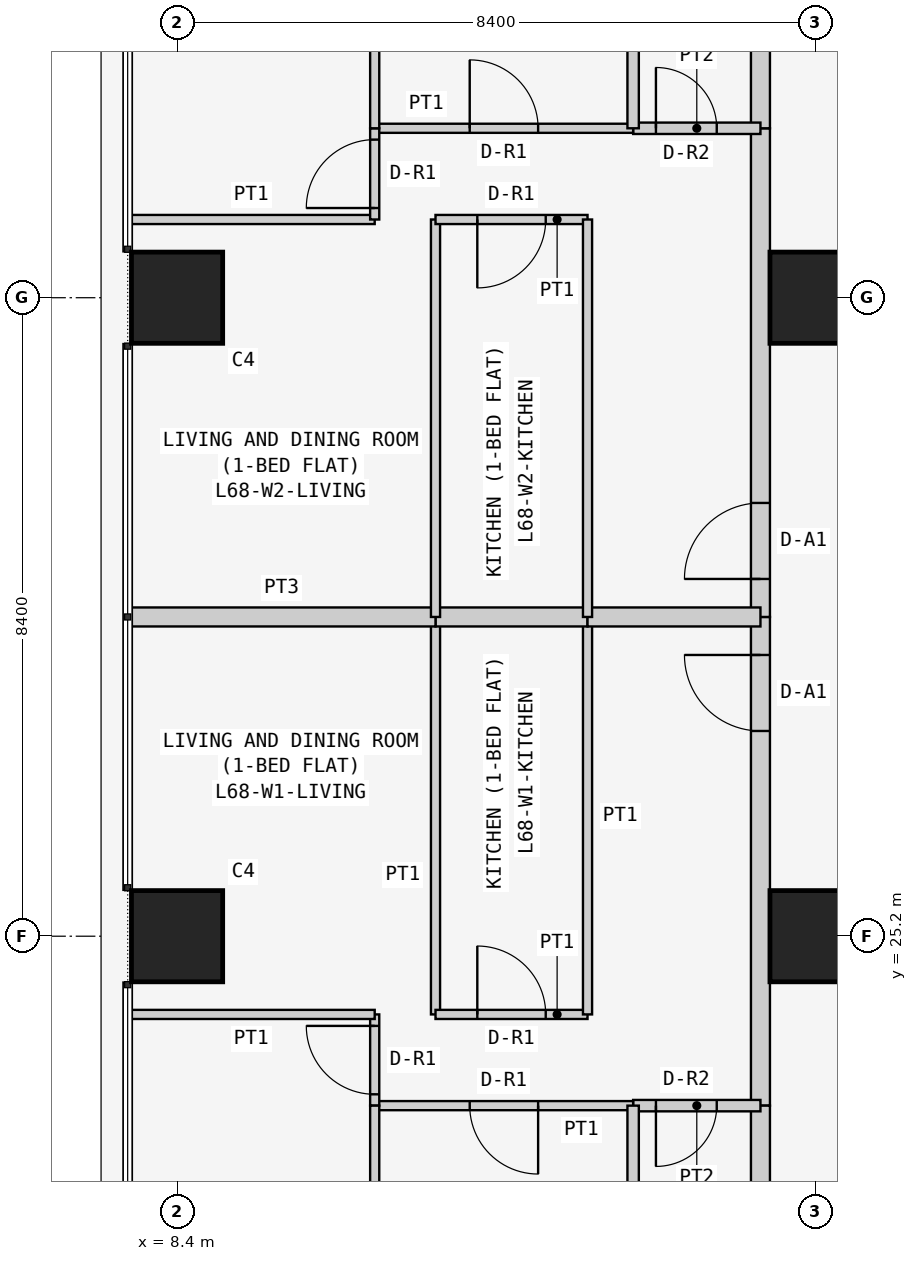
"""IFC4 building model, lengths in metres.
Left out: names, types, materials, properties, quantities, classifications, styles, units other than length and angle.
Written with IfcOpenShell. Run it as: python <this file> out.ifc"""

import sys

from ifc_helpers import new_model, si_unit, direction, frame, frame_2d, origin, origin_2d, place, context, subcontext, project, spatial, rectangle, extrude, element, fill, save


model = new_model("IFC4")
c1 = context("Model", 3, precision=1e-05, world=origin(), true_north=direction((0.0, 1.0)))
c2 = subcontext(c1, "Body", "Model", "MODEL_VIEW")
j1 = project(units=[si_unit("LENGTHUNIT", "METRE"), si_unit("PLANEANGLEUNIT", "RADIAN")], contexts=[c1])
p1 = place(None, origin())
s1 = spatial("IfcSite", under=j1, at=p1, CompositionType="ELEMENT")
p2 = place(p1, origin())
s2 = spatial("IfcBuilding", under=s1, at=p2, CompositionType="ELEMENT")
p3 = place(p2, frame((0.0, 0.0, 261.3)))
s3 = spatial("IfcBuildingStorey", under=s2, at=p3, CompositionType="ELEMENT", Elevation=261.3)
for number, where, z_axis, x_axis in (
    (1, (8.4, 25.2, 0.0), (0.0, 0.0, 1.0), (1.0, 0.0, 0.0)),
    (2, (8.4, 33.6, 0.0), (0.0, 0.0, 1.0), (1.0, 0.0, 0.0)),
    (3, (16.8, 25.2, 0.0), (0.0, 0.0, 1.0), (1.0, 0.0, 0.0)),
    (4, (16.8, 33.6, 0.0), (0.0, 0.0, 1.0), (1.0, 0.0, 0.0)),
):
    element("IfcColumn", number, at=place(p3, frame(where, z_axis=z_axis, x_axis=x_axis)), inside=s3, PredefinedType="COLUMN", context=c2, shape_type="SweptSolid", body=[
        extrude(rectangle(XDim=1.2, YDim=1.2, at=origin_2d()), origin(), (0.0, 0.0, 1.0), 3.6),
    ])
p4 = place(p3, frame((16.075, 22.971, 0.0), z_axis=(0.0, 0.0, 1.0), x_axis=(0.0, 1.0, 0.0)))
e5 = element("IfcWall", 5, at=p4, inside=s3, PredefinedType="PARTITIONING", context=c2, shape_type="SweptSolid", body=[
    extrude(rectangle(XDim=6.429, YDim=0.25, at=frame_2d((3.214, 0.0))), origin(), (0.0, 0.0, 1.0), 3.45),
])
p5 = place(p4, frame((4.929, 0.0, 0.0)))
e6 = element("IfcOpeningElement", 6, at=p5, cuts=e5, PredefinedType="OPENING", context=c2, shape_type="SweptSolid", body=[
    extrude(rectangle(XDim=1.0, YDim=2.1, at=frame_2d((0.5, 1.05))), frame((0.0, 0.135, 0.0), z_axis=(0.0, -1.0, 0.0), x_axis=(1.0, 0.0, 0.0)), (0.0, 0.0, 1.0), 0.27),
])
p6 = place(p3, frame((16.075, 16.1, 0.0), z_axis=(0.0, 0.0, 1.0), x_axis=(0.0, 1.0, 0.0)))
e7 = element("IfcWall", 7, at=p6, inside=s3, PredefinedType="PARTITIONING", context=c2, shape_type="SweptSolid", body=[
    extrude(rectangle(XDim=6.871, YDim=0.25, at=frame_2d((3.436, 0.0))), origin(), (0.0, 0.0, 1.0), 3.45),
])
p7 = place(p3, frame((16.075, 29.4, 0.0), z_axis=(0.0, 0.0, 1.0), x_axis=(0.0, 1.0, 0.0)))
e8 = element("IfcWall", 8, at=p7, inside=s3, PredefinedType="PARTITIONING", context=c2, shape_type="SweptSolid", body=[
    extrude(rectangle(XDim=6.429, YDim=0.25, at=frame_2d((3.215, 0.0))), origin(), (0.0, 0.0, 1.0), 3.45),
])
p8 = place(p7, frame((0.5, 0.0, 0.0)))
e9 = element("IfcOpeningElement", 9, at=p8, cuts=e8, PredefinedType="OPENING", context=c2, shape_type="SweptSolid", body=[
    extrude(rectangle(XDim=1.0, YDim=2.1, at=frame_2d((0.5, 1.05))), frame((0.0, 0.135, 0.0), z_axis=(0.0, -1.0, 0.0), x_axis=(1.0, 0.0, 0.0)), (0.0, 0.0, 1.0), 0.27),
])
p9 = place(p3, frame((16.075, 35.829, 0.0), z_axis=(0.0, 0.0, 1.0), x_axis=(0.0, 1.0, 0.0)))
e10 = element("IfcWall", 10, at=p9, inside=s3, PredefinedType="PARTITIONING", context=c2, shape_type="SweptSolid", body=[
    extrude(rectangle(XDim=6.871, YDim=0.25, at=frame_2d((3.436, 0.0))), origin(), (0.0, 0.0, 1.0), 3.45),
])
p10 = place(p3, frame((11.8, 29.4, 0.0), z_axis=(0.0, 0.0, 1.0), x_axis=(0.0, -1.0, 0.0)))
e11 = element("IfcWall", 11, at=p10, inside=s3, PredefinedType="PARTITIONING", context=c2, shape_type="SweptSolid", body=[
    extrude(rectangle(XDim=5.229, YDim=0.12, at=frame_2d((2.615, 0.0))), origin(), (0.0, 0.0, 1.0), 3.45),
])
p11 = place(p3, frame((11.8, 24.171, 0.0), z_axis=(0.0, 0.0, 1.0), x_axis=(1.0, 0.0, 0.0)))
e12 = element("IfcWall", 12, at=p11, inside=s3, PredefinedType="PARTITIONING", context=c2, shape_type="SweptSolid", body=[
    extrude(rectangle(XDim=2.0, YDim=0.12, at=frame_2d((1.0, 0.0))), origin(), (0.0, 0.0, 1.0), 3.45),
])
p12 = place(p11, frame((0.55, 0.0, 0.0)))
e13 = element("IfcOpeningElement", 13, at=p12, cuts=e12, PredefinedType="OPENING", context=c2, shape_type="SweptSolid", body=[
    extrude(rectangle(XDim=0.9, YDim=2.1, at=frame_2d((0.45, 1.05))), frame((0.0, 0.07, 0.0), z_axis=(0.0, -1.0, 0.0), x_axis=(1.0, 0.0, 0.0)), (0.0, 0.0, 1.0), 0.14),
])
p13 = place(p3, frame((13.8, 24.171, 0.0), z_axis=(0.0, 0.0, 1.0), x_axis=(0.0, 1.0, 0.0)))
e14 = element("IfcWall", 14, at=p13, inside=s3, PredefinedType="PARTITIONING", context=c2, shape_type="SweptSolid", body=[
    extrude(rectangle(XDim=5.229, YDim=0.12, at=frame_2d((2.615, 0.0))), origin(), (0.0, 0.0, 1.0), 3.45),
])
p14 = place(p3, frame((13.8, 29.4, 0.0), z_axis=(0.0, 0.0, 1.0), x_axis=(-1.0, 0.0, 0.0)))
e15 = element("IfcWall", 15, at=p14, inside=s3, PredefinedType="PARTITIONING", context=c2, shape_type="SweptSolid", body=[
    extrude(rectangle(XDim=2.0, YDim=0.25, at=frame_2d((1.0, 0.0))), origin(), (0.0, 0.0, 1.0), 3.45),
])
p15 = place(p3, frame((16.075, 22.971, 0.0), z_axis=(0.0, 0.0, 1.0), x_axis=(-1.0, 0.0, 0.0)))
e16 = element("IfcWall", 16, at=p15, inside=s3, PredefinedType="PARTITIONING", context=c2, shape_type="SweptSolid", body=[
    extrude(rectangle(XDim=1.675, YDim=0.15, at=frame_2d((0.837, 0.0))), origin(), (0.0, 0.0, 1.0), 3.45),
])
p16 = place(p15, frame((0.575, 0.0, 0.0)))
e17 = element("IfcOpeningElement", 17, at=p16, cuts=e16, PredefinedType="OPENING", context=c2, shape_type="SweptSolid", body=[
    extrude(rectangle(XDim=0.8, YDim=2.1, at=frame_2d((0.4, 1.05))), frame((0.0, 0.085, 0.0), z_axis=(0.0, -1.0, 0.0), x_axis=(1.0, 0.0, 0.0)), (0.0, 0.0, 1.0), 0.17),
])
p17 = place(p3, frame((14.4, 22.971, 0.0), z_axis=(0.0, 0.0, 1.0), x_axis=(-1.0, 0.0, 0.0)))
e18 = element("IfcWall", 18, at=p17, inside=s3, PredefinedType="PARTITIONING", context=c2, shape_type="SweptSolid", body=[
    extrude(rectangle(XDim=3.4, YDim=0.12, at=frame_2d((1.7, 0.0))), origin(), (0.0, 0.0, 1.0), 3.45),
])
p18 = place(p17, frame((1.25, 0.0, 0.0)))
e19 = element("IfcOpeningElement", 19, at=p18, cuts=e18, PredefinedType="OPENING", context=c2, shape_type="SweptSolid", body=[
    extrude(rectangle(XDim=0.9, YDim=2.1, at=frame_2d((0.45, 1.05))), frame((0.0, 0.07, 0.0), z_axis=(0.0, -1.0, 0.0), x_axis=(1.0, 0.0, 0.0)), (0.0, 0.0, 1.0), 0.14),
])
p19 = place(p3, frame((11.0, 22.971, 0.0), z_axis=(0.0, 0.0, 1.0), x_axis=(0.0, 1.0, 0.0)))
e20 = element("IfcWall", 20, at=p19, inside=s3, PredefinedType="PARTITIONING", context=c2, shape_type="SweptSolid", body=[
    extrude(rectangle(XDim=1.2, YDim=0.12, at=frame_2d((0.6, 0.0))), origin(), (0.0, 0.0, 1.0), 3.45),
])
p20 = place(p19, frame((0.149, 0.0, 0.0)))
e21 = element("IfcOpeningElement", 21, at=p20, cuts=e20, PredefinedType="OPENING", context=c2, shape_type="SweptSolid", body=[
    extrude(rectangle(XDim=0.9, YDim=2.1, at=frame_2d((0.45, 1.05))), frame((0.0, 0.07, 0.0), z_axis=(0.0, -1.0, 0.0), x_axis=(1.0, 0.0, 0.0)), (0.0, 0.0, 1.0), 0.14),
])
p21 = place(p3, frame((11.0, 24.171, 0.0), z_axis=(0.0, 0.0, 1.0), x_axis=(-1.0, 0.0, 0.0)))
e22 = element("IfcWall", 22, at=p21, inside=s3, PredefinedType="PARTITIONING", context=c2, shape_type="SweptSolid", body=[
    extrude(rectangle(XDim=3.25, YDim=0.12, at=frame_2d((1.625, 0.0))), origin(), (0.0, 0.0, 1.0), 3.45),
])
p22 = place(p3, frame((7.75, 29.4, 0.0), z_axis=(0.0, 0.0, 1.0), x_axis=(1.0, 0.0, 0.0)))
e23 = element("IfcWall", 23, at=p22, inside=s3, PredefinedType="PARTITIONING", context=c2, shape_type="SweptSolid", body=[
    extrude(rectangle(XDim=4.05, YDim=0.25, at=frame_2d((2.025, 0.0))), origin(), (0.0, 0.0, 1.0), 3.45),
])
p23 = place(p3, frame((13.8, 29.4, 0.0), z_axis=(0.0, 0.0, 1.0), x_axis=(1.0, 0.0, 0.0)))
e24 = element("IfcWall", 24, at=p23, inside=s3, PredefinedType="PARTITIONING", context=c2, shape_type="SweptSolid", body=[
    extrude(rectangle(XDim=2.275, YDim=0.25, at=frame_2d((1.137, 0.0))), origin(), (0.0, 0.0, 1.0), 3.45),
])
p24 = place(p3, frame((14.4, 22.971, 0.0), z_axis=(0.0, 0.0, 1.0), x_axis=(0.0, -1.0, 0.0)))
e25 = element("IfcWall", 25, at=p24, inside=s3, PredefinedType="PARTITIONING", context=c2, shape_type="SweptSolid", body=[
    extrude(rectangle(XDim=6.871, YDim=0.15, at=frame_2d((3.436, 0.0))), origin(), (0.0, 0.0, 1.0), 3.45),
])
p25 = place(p3, frame((11.0, 22.971, 0.0), z_axis=(0.0, 0.0, 1.0), x_axis=(0.0, -1.0, 0.0)))
e26 = element("IfcWall", 26, at=p25, inside=s3, PredefinedType="PARTITIONING", context=c2, shape_type="SweptSolid", body=[
    extrude(rectangle(XDim=6.871, YDim=0.12, at=frame_2d((3.436, 0.0))), origin(), (0.0, 0.0, 1.0), 3.45),
])
p26 = place(p3, frame((11.8, 29.4, 0.0), z_axis=(0.0, 0.0, 1.0), x_axis=(0.0, 1.0, 0.0)))
e27 = element("IfcWall", 27, at=p26, inside=s3, PredefinedType="PARTITIONING", context=c2, shape_type="SweptSolid", body=[
    extrude(rectangle(XDim=5.229, YDim=0.12, at=frame_2d((2.615, 0.0))), origin(), (0.0, 0.0, 1.0), 3.45),
])
p27 = place(p3, frame((11.8, 34.629, 0.0), z_axis=(0.0, 0.0, 1.0), x_axis=(1.0, 0.0, 0.0)))
e28 = element("IfcWall", 28, at=p27, inside=s3, PredefinedType="PARTITIONING", context=c2, shape_type="SweptSolid", body=[
    extrude(rectangle(XDim=2.0, YDim=0.12, at=frame_2d((1.0, 0.0))), origin(), (0.0, 0.0, 1.0), 3.45),
])
p28 = place(p27, frame((0.55, 0.0, 0.0)))
e29 = element("IfcOpeningElement", 29, at=p28, cuts=e28, PredefinedType="OPENING", context=c2, shape_type="SweptSolid", body=[
    extrude(rectangle(XDim=0.9, YDim=2.1, at=frame_2d((0.45, 1.05))), frame((0.0, 0.07, 0.0), z_axis=(0.0, -1.0, 0.0), x_axis=(1.0, 0.0, 0.0)), (0.0, 0.0, 1.0), 0.14),
])
p29 = place(p3, frame((13.8, 34.629, 0.0), z_axis=(0.0, 0.0, 1.0), x_axis=(0.0, -1.0, 0.0)))
e30 = element("IfcWall", 30, at=p29, inside=s3, PredefinedType="PARTITIONING", context=c2, shape_type="SweptSolid", body=[
    extrude(rectangle(XDim=5.229, YDim=0.12, at=frame_2d((2.615, 0.0))), origin(), (0.0, 0.0, 1.0), 3.45),
])
p30 = place(p3, frame((14.4, 35.829, 0.0), z_axis=(0.0, 0.0, 1.0), x_axis=(1.0, 0.0, 0.0)))
e31 = element("IfcWall", 31, at=p30, inside=s3, PredefinedType="PARTITIONING", context=c2, shape_type="SweptSolid", body=[
    extrude(rectangle(XDim=1.675, YDim=0.15, at=frame_2d((0.837, 0.0))), origin(), (0.0, 0.0, 1.0), 3.45),
])
p31 = place(p30, frame((0.3, 0.0, 0.0)))
e32 = element("IfcOpeningElement", 32, at=p31, cuts=e31, PredefinedType="OPENING", context=c2, shape_type="SweptSolid", body=[
    extrude(rectangle(XDim=0.8, YDim=2.1, at=frame_2d((0.4, 1.05))), frame((0.0, 0.085, 0.0), z_axis=(0.0, -1.0, 0.0), x_axis=(1.0, 0.0, 0.0)), (0.0, 0.0, 1.0), 0.17),
])
p32 = place(p3, frame((11.0, 35.829, 0.0), z_axis=(0.0, 0.0, 1.0), x_axis=(1.0, 0.0, 0.0)))
e33 = element("IfcWall", 33, at=p32, inside=s3, PredefinedType="PARTITIONING", context=c2, shape_type="SweptSolid", body=[
    extrude(rectangle(XDim=3.4, YDim=0.12, at=frame_2d((1.7, 0.0))), origin(), (0.0, 0.0, 1.0), 3.45),
])
p33 = place(p32, frame((1.25, 0.0, 0.0)))
e34 = element("IfcOpeningElement", 34, at=p33, cuts=e33, PredefinedType="OPENING", context=c2, shape_type="SweptSolid", body=[
    extrude(rectangle(XDim=0.9, YDim=2.1, at=frame_2d((0.45, 1.05))), frame((0.0, 0.07, 0.0), z_axis=(0.0, -1.0, 0.0), x_axis=(1.0, 0.0, 0.0)), (0.0, 0.0, 1.0), 0.14),
])
p34 = place(p3, frame((7.75, 34.629, 0.0), z_axis=(0.0, 0.0, 1.0), x_axis=(1.0, 0.0, 0.0)))
e35 = element("IfcWall", 35, at=p34, inside=s3, PredefinedType="PARTITIONING", context=c2, shape_type="SweptSolid", body=[
    extrude(rectangle(XDim=3.25, YDim=0.12, at=frame_2d((1.625, 0.0))), origin(), (0.0, 0.0, 1.0), 3.45),
])
p35 = place(p3, frame((11.0, 34.629, 0.0), z_axis=(0.0, 0.0, 1.0), x_axis=(0.0, 1.0, 0.0)))
e36 = element("IfcWall", 36, at=p35, inside=s3, PredefinedType="PARTITIONING", context=c2, shape_type="SweptSolid", body=[
    extrude(rectangle(XDim=1.2, YDim=0.12, at=frame_2d((0.6, 0.0))), origin(), (0.0, 0.0, 1.0), 3.45),
])
p36 = place(p35, frame((0.151, 0.0, 0.0)))
e37 = element("IfcOpeningElement", 37, at=p36, cuts=e36, PredefinedType="OPENING", context=c2, shape_type="SweptSolid", body=[
    extrude(rectangle(XDim=0.9, YDim=2.1, at=frame_2d((0.45, 1.05))), frame((0.0, 0.07, 0.0), z_axis=(0.0, -1.0, 0.0), x_axis=(1.0, 0.0, 0.0)), (0.0, 0.0, 1.0), 0.14),
])
p37 = place(p3, frame((14.4, 35.829, 0.0), z_axis=(0.0, 0.0, 1.0), x_axis=(0.0, 1.0, 0.0)))
e38 = element("IfcWall", 38, at=p37, inside=s3, PredefinedType="PARTITIONING", context=c2, shape_type="SweptSolid", body=[
    extrude(rectangle(XDim=6.871, YDim=0.15, at=frame_2d((3.436, 0.0))), origin(), (0.0, 0.0, 1.0), 3.45),
])
p38 = place(p3, frame((11.0, 35.829, 0.0), z_axis=(0.0, 0.0, 1.0), x_axis=(0.0, 1.0, 0.0)))
e39 = element("IfcWall", 39, at=p38, inside=s3, PredefinedType="PARTITIONING", context=c2, shape_type="SweptSolid", body=[
    extrude(rectangle(XDim=6.871, YDim=0.12, at=frame_2d((3.436, 0.0))), origin(), (0.0, 0.0, 1.0), 3.45),
])
p39 = place(p5, origin())
e40 = element("IfcDoor", 40, at=p39, inside=s3, OperationType="SINGLE_SWING_RIGHT", PredefinedType="DOOR", context=c2, shape_type="SweptSolid", body=[
    extrude(rectangle(XDim=1.0, YDim=2.1, at=frame_2d((0.5, 1.05))), frame((0.0, 0.025, 0.0), z_axis=(0.0, -1.0, 0.0), x_axis=(1.0, 0.0, 0.0)), (0.0, 0.0, 1.0), 0.05),
])
fill(e6, e40)
p40 = place(p12, origin())
e41 = element("IfcDoor", 41, at=p40, inside=s3, OperationType="SINGLE_SWING_LEFT", PredefinedType="DOOR", context=c2, shape_type="SweptSolid", body=[
    extrude(rectangle(XDim=0.9, YDim=2.1, at=frame_2d((0.45, 1.05))), frame((0.0, 0.025, 0.0), z_axis=(0.0, -1.0, 0.0), x_axis=(1.0, 0.0, 0.0)), (0.0, 0.0, 1.0), 0.05),
])
fill(e13, e41)
p41 = place(p16, origin())
e42 = element("IfcDoor", 42, at=p41, inside=s3, OperationType="SINGLE_SWING_RIGHT", PredefinedType="DOOR", context=c2, shape_type="SweptSolid", body=[
    extrude(rectangle(XDim=0.8, YDim=2.1, at=frame_2d((0.4, 1.05))), frame((0.0, 0.025, 0.0), z_axis=(0.0, -1.0, 0.0), x_axis=(1.0, 0.0, 0.0)), (0.0, 0.0, 1.0), 0.05),
])
fill(e17, e42)
p42 = place(p18, origin())
e43 = element("IfcDoor", 43, at=p42, inside=s3, OperationType="SINGLE_SWING_LEFT", PredefinedType="DOOR", context=c2, shape_type="SweptSolid", body=[
    extrude(rectangle(XDim=0.9, YDim=2.1, at=frame_2d((0.45, 1.05))), frame((0.0, 0.025, 0.0), z_axis=(0.0, -1.0, 0.0), x_axis=(1.0, 0.0, 0.0)), (0.0, 0.0, 1.0), 0.05),
])
fill(e19, e43)
p43 = place(p20, origin())
e44 = element("IfcDoor", 44, at=p43, inside=s3, OperationType="SINGLE_SWING_RIGHT", PredefinedType="DOOR", context=c2, shape_type="SweptSolid", body=[
    extrude(rectangle(XDim=0.9, YDim=2.1, at=frame_2d((0.45, 1.05))), frame((0.0, 0.025, 0.0), z_axis=(0.0, -1.0, 0.0), x_axis=(1.0, 0.0, 0.0)), (0.0, 0.0, 1.0), 0.05),
])
fill(e21, e44)
p44 = place(p8, origin())
e45 = element("IfcDoor", 45, at=p44, inside=s3, OperationType="SINGLE_SWING_LEFT", PredefinedType="DOOR", context=c2, shape_type="SweptSolid", body=[
    extrude(rectangle(XDim=1.0, YDim=2.1, at=frame_2d((0.5, 1.05))), frame((0.0, 0.025, 0.0), z_axis=(0.0, -1.0, 0.0), x_axis=(1.0, 0.0, 0.0)), (0.0, 0.0, 1.0), 0.05),
])
fill(e9, e45)
p45 = place(p28, frame((0.9, 0.0, 0.0), z_axis=(0.0, 0.0, 1.0), x_axis=(-1.0, 0.0, 0.0)))
e46 = element("IfcDoor", 46, at=p45, inside=s3, OperationType="SINGLE_SWING_RIGHT", PredefinedType="DOOR", context=c2, shape_type="SweptSolid", body=[
    extrude(rectangle(XDim=0.9, YDim=2.1, at=frame_2d((0.45, 1.05))), frame((0.0, 0.025, 0.0), z_axis=(0.0, -1.0, 0.0), x_axis=(1.0, 0.0, 0.0)), (0.0, 0.0, 1.0), 0.05),
])
fill(e29, e46)
p46 = place(p31, origin())
e47 = element("IfcDoor", 47, at=p46, inside=s3, OperationType="SINGLE_SWING_LEFT", PredefinedType="DOOR", context=c2, shape_type="SweptSolid", body=[
    extrude(rectangle(XDim=0.8, YDim=2.1, at=frame_2d((0.4, 1.05))), frame((0.0, 0.025, 0.0), z_axis=(0.0, -1.0, 0.0), x_axis=(1.0, 0.0, 0.0)), (0.0, 0.0, 1.0), 0.05),
])
fill(e32, e47)
p47 = place(p33, origin())
e48 = element("IfcDoor", 48, at=p47, inside=s3, OperationType="SINGLE_SWING_LEFT", PredefinedType="DOOR", context=c2, shape_type="SweptSolid", body=[
    extrude(rectangle(XDim=0.9, YDim=2.1, at=frame_2d((0.45, 1.05))), frame((0.0, 0.025, 0.0), z_axis=(0.0, -1.0, 0.0), x_axis=(1.0, 0.0, 0.0)), (0.0, 0.0, 1.0), 0.05),
])
fill(e34, e48)
p48 = place(p36, origin())
e49 = element("IfcDoor", 49, at=p48, inside=s3, OperationType="SINGLE_SWING_LEFT", PredefinedType="DOOR", context=c2, shape_type="SweptSolid", body=[
    extrude(rectangle(XDim=0.9, YDim=2.1, at=frame_2d((0.45, 1.05))), frame((0.0, 0.025, 0.0), z_axis=(0.0, -1.0, 0.0), x_axis=(1.0, 0.0, 0.0)), (0.0, 0.0, 1.0), 0.05),
])
fill(e37, e49)
save(model, sys.argv[1])
